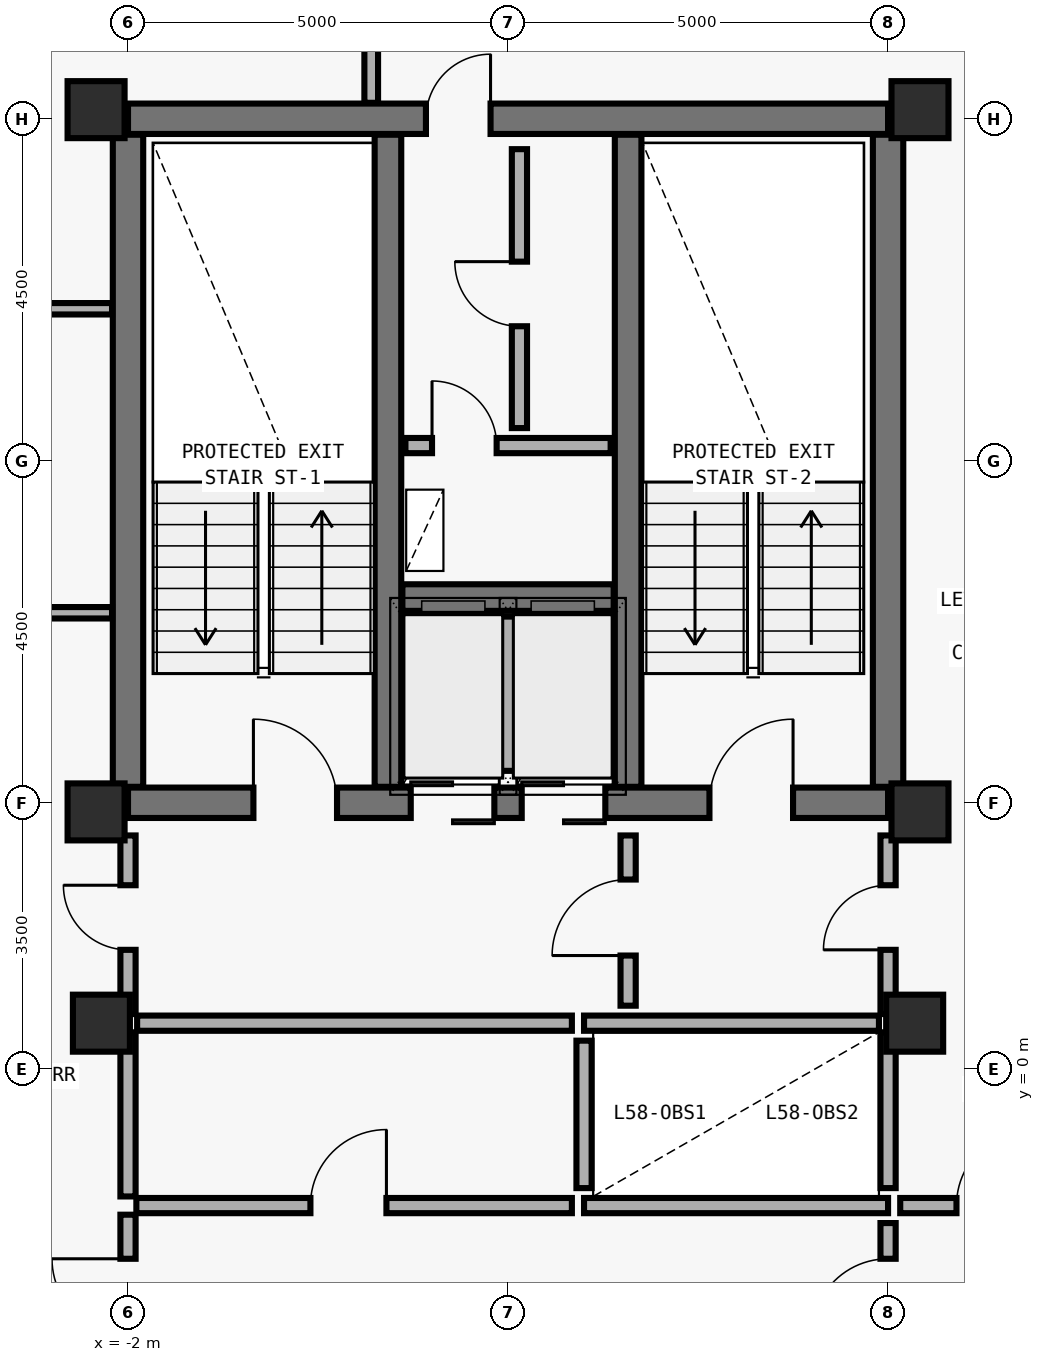
"""IFC4 building model, lengths in metres.
Left out: names, types, materials, properties, quantities, classifications, styles, units other than length and angle.
Written with IfcOpenShell. Run it as: python <this file> out.ifc"""

import sys

from ifc_helpers import new_model, si_unit, direction, frame, frame_2d, origin, origin_2d, place, context, subcontext, project, spatial, rectangle, extrude, element, fill, save


model = new_model("IFC4")
c1 = context("Model", 3, precision=1e-05, world=origin(), true_north=direction((0.0, 1.0)))
c2 = subcontext(c1, "Body", "Model", "MODEL_VIEW")
j1 = project(units=[si_unit("LENGTHUNIT", "METRE"), si_unit("PLANEANGLEUNIT", "RADIAN")], contexts=[c1])
p1 = place(None, origin())
s1 = spatial("IfcSite", under=j1, at=p1, CompositionType="ELEMENT")
p2 = place(p1, origin())
s2 = spatial("IfcBuilding", under=s1, at=p2, CompositionType="ELEMENT")
p3 = place(p2, frame((0.0, 0.0, 229.2)))
s3 = spatial("IfcBuildingStorey", under=s2, at=p3, CompositionType="ELEMENT", Elevation=229.2)
p4 = place(p3, frame((-2.0, 3.5, 0.0), z_axis=(0.0, 0.0, 1.0), x_axis=(1.0, 0.0, 0.0)))
e1 = element("IfcWall", 1, at=p4, inside=s3, PredefinedType="SHEAR", context=c2, shape_type="SweptSolid", body=[
    extrude(rectangle(XDim=10.0, YDim=0.4, at=frame_2d((5.0, 0.0))), origin(), (0.0, 0.0, 1.0), 3.592),
])
p5 = place(p4, frame((1.65, 0.0, 0.0)))
e2 = element("IfcOpeningElement", 2, at=p5, cuts=e1, PredefinedType="OPENING", context=c2, shape_type="SweptSolid", body=[
    extrude(rectangle(XDim=1.1, YDim=2.15, at=frame_2d((0.55, 1.075))), frame((0.0, 0.21, 0.0), z_axis=(0.0, -1.0, 0.0), x_axis=(1.0, 0.0, 0.0)), (0.0, 0.0, 1.0), 0.42),
])
p6 = place(p4, frame((7.65, 0.0, 0.0)))
e3 = element("IfcOpeningElement", 3, at=p6, cuts=e1, PredefinedType="OPENING", context=c2, shape_type="SweptSolid", body=[
    extrude(rectangle(XDim=1.1, YDim=2.15, at=frame_2d((0.55, 1.075))), frame((0.0, 0.21, 0.0), z_axis=(0.0, -1.0, 0.0), x_axis=(1.0, 0.0, 0.0)), (0.0, 0.0, 1.0), 0.42),
])
p7 = place(p4, frame((3.72, 0.0, 0.0)))
e4 = element("IfcOpeningElement", 4, at=p7, cuts=e1, PredefinedType="OPENING", context=c2, shape_type="SweptSolid", body=[
    extrude(rectangle(XDim=1.1, YDim=2.2, at=frame_2d((0.55, 1.1))), frame((0.0, 0.21, 0.0), z_axis=(0.0, -1.0, 0.0), x_axis=(1.0, 0.0, 0.0)), (0.0, 0.0, 1.0), 0.42),
])
p8 = place(p4, frame((5.18, 0.0, 0.0)))
e5 = element("IfcOpeningElement", 5, at=p8, cuts=e1, PredefinedType="OPENING", context=c2, shape_type="SweptSolid", body=[
    extrude(rectangle(XDim=1.1, YDim=2.2, at=frame_2d((0.55, 1.1))), frame((0.0, 0.21, 0.0), z_axis=(0.0, -1.0, 0.0), x_axis=(1.0, 0.0, 0.0)), (0.0, 0.0, 1.0), 0.42),
])
p9 = place(p3, frame((-2.0, 12.5, 0.0), z_axis=(0.0, 0.0, 1.0), x_axis=(1.0, 0.0, 0.0)))
e6 = element("IfcWall", 6, at=p9, inside=s3, PredefinedType="SHEAR", context=c2, shape_type="SweptSolid", body=[
    extrude(rectangle(XDim=10.0, YDim=0.4, at=frame_2d((5.0, 0.0))), origin(), (0.0, 0.0, 1.0), 3.592),
])
p10 = place(p9, frame((3.92, 0.0, 0.0)))
e7 = element("IfcOpeningElement", 7, at=p10, cuts=e6, PredefinedType="OPENING", context=c2, shape_type="SweptSolid", body=[
    extrude(rectangle(XDim=0.85, YDim=2.1, at=frame_2d((0.425, 1.05))), frame((0.0, 0.21, 0.0), z_axis=(0.0, -1.0, 0.0), x_axis=(1.0, 0.0, 0.0)), (0.0, 0.0, 1.0), 0.42),
])
for number, where, z_axis, x_axis in (
    (8, (-2.0, 3.71, 0.0), (0.0, 0.0, 1.0), (0.0, 1.0, 0.0)),
    (9, (8.0, 3.71, 0.0), (0.0, 0.0, 1.0), (0.0, 1.0, 0.0)),
):
    element("IfcWall", number, at=place(p3, frame(where, z_axis=z_axis, x_axis=x_axis)), inside=s3, PredefinedType="SHEAR", context=c2, shape_type="SweptSolid", body=[
        extrude(rectangle(XDim=8.58, YDim=0.4, at=frame_2d((4.29, 0.0))), origin(), (0.0, 0.0, 1.0), 3.592),
    ])
for number, where, z_axis, x_axis in (
    (10, (1.42, 3.71, 0.0), (0.0, 0.0, 1.0), (0.0, 1.0, 0.0)),
    (11, (4.58, 3.71, 0.0), (0.0, 0.0, 1.0), (0.0, 1.0, 0.0)),
):
    element("IfcWall", number, at=place(p3, frame(where, z_axis=z_axis, x_axis=x_axis)), inside=s3, PredefinedType="SHEAR", context=c2, shape_type="SweptSolid", body=[
        extrude(rectangle(XDim=8.58, YDim=0.35, at=frame_2d((4.29, 0.0))), origin(), (0.0, 0.0, 1.0), 3.592),
    ])
p11 = place(p3, frame((1.61, 6.2, 0.0), z_axis=(0.0, 0.0, 1.0), x_axis=(1.0, 0.0, 0.0)))
e12 = element("IfcWall", 12, at=p11, inside=s3, PredefinedType="SHEAR", context=c2, shape_type="SweptSolid", body=[
    extrude(rectangle(XDim=2.78, YDim=0.35, at=frame_2d((1.39, 0.0))), origin(), (0.0, 0.0, 1.0), 3.592),
])
for number, where, z_axis, x_axis in (
    (13, (-2.42, 12.62, 0.0), (0.0, 0.0, 1.0), (1.0, 0.0, 0.0)),
    (14, (8.42, 12.62, 0.0), (0.0, 0.0, 1.0), (1.0, 0.0, 0.0)),
    (15, (-2.42, 3.38, 0.0), (0.0, 0.0, 1.0), (1.0, 0.0, 0.0)),
    (16, (8.42, 3.38, 0.0), (0.0, 0.0, 1.0), (1.0, 0.0, 0.0)),
    (17, (-2.35, 0.6, 0.0), (0.0, 0.0, 1.0), (1.0, 0.0, 0.0)),
    (18, (8.35, 0.6, 0.0), (0.0, 0.0, 1.0), (1.0, 0.0, 0.0)),
):
    element("IfcColumn", number, at=place(p3, frame(where, z_axis=z_axis, x_axis=x_axis)), inside=s3, PredefinedType="COLUMN", context=c2, shape_type="SweptSolid", body=[
        extrude(rectangle(XDim=0.75, YDim=0.75, at=origin_2d()), origin(), (0.0, 0.0, 1.0), 3.575),
    ])
p12 = place(p3, frame((3.0, 3.92, 0.0), z_axis=(0.0, 0.0, 1.0), x_axis=(0.0, 1.0, 0.0)))
e19 = element("IfcWall", 19, at=p12, inside=s3, PredefinedType="SOLIDWALL", context=c2, shape_type="SweptSolid", body=[
    extrude(rectangle(XDim=2.03, YDim=0.2, at=frame_2d((1.015, 0.0))), origin(), (0.0, 0.0, 1.0), 3.36),
])
p13 = place(p3, frame((4.0, 0.6, 0.0), z_axis=(0.0, 0.0, 1.0), x_axis=(1.0, 0.0, 0.0)))
e20 = element("IfcWall", 20, at=p13, inside=s3, PredefinedType="SOLIDWALL", context=c2, shape_type="SweptSolid", body=[
    extrude(rectangle(XDim=3.88, YDim=0.2, at=frame_2d((1.94, 0.0))), origin(), (0.0, 0.0, 1.0), 3.072),
])
p14 = place(p3, frame((4.0, -1.8, 0.0), z_axis=(0.0, 0.0, 1.0), x_axis=(1.0, 0.0, 0.0)))
e21 = element("IfcWall", 21, at=p14, inside=s3, PredefinedType="SOLIDWALL", context=c2, shape_type="SweptSolid", body=[
    extrude(rectangle(XDim=4.0, YDim=0.2, at=frame_2d((2.0, 0.0))), origin(), (0.0, 0.0, 1.0), 3.36),
])
p15 = place(p3, frame((4.0, -1.57, 0.0), z_axis=(0.0, 0.0, 1.0), x_axis=(0.0, 1.0, 0.0)))
e22 = element("IfcWall", 22, at=p15, inside=s3, PredefinedType="SOLIDWALL", context=c2, shape_type="SweptSolid", body=[
    extrude(rectangle(XDim=1.94, YDim=0.2, at=frame_2d((0.97, 0.0))), origin(), (0.0, 0.0, 1.0), 3.36),
])
p16 = place(p3, frame((8.0, -1.57, 0.0), z_axis=(0.0, 0.0, 1.0), x_axis=(0.0, 1.0, 0.0)))
e23 = element("IfcWall", 23, at=p16, inside=s3, PredefinedType="SOLIDWALL", context=c2, shape_type="SweptSolid", body=[
    extrude(rectangle(XDim=2.05, YDim=0.2, at=frame_2d((1.025, 0.0))), origin(), (0.0, 0.0, 1.0), 3.072),
])
p17 = place(p3, frame((1.65, 8.2, 0.0), z_axis=(0.0, 0.0, 1.0), x_axis=(1.0, 0.0, 0.0)))
e24 = element("IfcWall", 24, at=p17, inside=s3, PredefinedType="MOVABLE", context=c2, shape_type="SweptSolid", body=[
    extrude(rectangle(XDim=2.7, YDim=0.2, at=frame_2d((1.35, 0.0))), origin(), (0.0, 0.0, 1.0), 3.36),
])
p18 = place(p17, frame((0.35, 0.0, 0.0)))
e25 = element("IfcOpeningElement", 25, at=p18, cuts=e24, PredefinedType="OPENING", context=c2, shape_type="SweptSolid", body=[
    extrude(rectangle(XDim=0.85, YDim=2.1, at=frame_2d((0.425, 1.05))), frame((0.0, 0.11, 0.0), z_axis=(0.0, -1.0, 0.0), x_axis=(1.0, 0.0, 0.0)), (0.0, 0.0, 1.0), 0.22),
])
p19 = place(p3, frame((3.15, 8.43, 0.0), z_axis=(0.0, 0.0, 1.0), x_axis=(0.0, 1.0, 0.0)))
e26 = element("IfcWall", 26, at=p19, inside=s3, PredefinedType="MOVABLE", context=c2, shape_type="SweptSolid", body=[
    extrude(rectangle(XDim=3.67, YDim=0.2, at=frame_2d((1.835, 0.0))), origin(), (0.0, 0.0, 1.0), 3.36),
])
p20 = place(p19, frame((1.34, 0.0, 0.0)))
e27 = element("IfcOpeningElement", 27, at=p20, cuts=e26, PredefinedType="OPENING", context=c2, shape_type="SweptSolid", body=[
    extrude(rectangle(XDim=0.85, YDim=2.1, at=frame_2d((0.425, 1.05))), frame((0.0, 0.11, 0.0), z_axis=(0.0, -1.0, 0.0), x_axis=(1.0, 0.0, 0.0)), (0.0, 0.0, 1.0), 0.22),
])
p21 = place(p3, frame((4.58, 0.83, 0.0), z_axis=(0.0, 0.0, 1.0), x_axis=(0.0, 1.0, 0.0)))
e28 = element("IfcWall", 28, at=p21, inside=s3, PredefinedType="MOVABLE", context=c2, shape_type="SweptSolid", body=[
    extrude(rectangle(XDim=2.24, YDim=0.2, at=frame_2d((1.12, 0.0))), origin(), (0.0, 0.0, 1.0), 3.36),
])
p22 = place(p21, frame((0.66, 0.0, 0.0)))
e29 = element("IfcOpeningElement", 29, at=p22, cuts=e28, PredefinedType="OPENING", context=c2, shape_type="SweptSolid", body=[
    extrude(rectangle(XDim=1.0, YDim=2.1, at=frame_2d((0.5, 1.05))), frame((0.0, 0.11, 0.0), z_axis=(0.0, -1.0, 0.0), x_axis=(1.0, 0.0, 0.0)), (0.0, 0.0, 1.0), 0.22),
])
p23 = place(p3, frame((-2.0, 0.72, 0.0), z_axis=(0.0, 0.0, 1.0), x_axis=(0.0, 1.0, 0.0)))
e30 = element("IfcWall", 30, at=p23, inside=s3, PredefinedType="MOVABLE", context=c2, shape_type="SweptSolid", body=[
    extrude(rectangle(XDim=2.35, YDim=0.2, at=frame_2d((1.175, 0.0))), origin(), (0.0, 0.0, 1.0), 2.692),
])
p24 = place(p23, frame((0.845, 0.0, 0.0)))
e31 = element("IfcOpeningElement", 31, at=p24, cuts=e30, PredefinedType="OPENING", context=c2, shape_type="SweptSolid", body=[
    extrude(rectangle(XDim=0.85, YDim=2.1, at=frame_2d((0.425, 1.05))), frame((0.0, 0.11, 0.0), z_axis=(0.0, -1.0, 0.0), x_axis=(1.0, 0.0, 0.0)), (0.0, 0.0, 1.0), 0.22),
])
p25 = place(p3, frame((8.0, 0.72, 0.0), z_axis=(0.0, 0.0, 1.0), x_axis=(0.0, 1.0, 0.0)))
e32 = element("IfcWall", 32, at=p25, inside=s3, PredefinedType="MOVABLE", context=c2, shape_type="SweptSolid", body=[
    extrude(rectangle(XDim=2.35, YDim=0.2, at=frame_2d((1.175, 0.0))), origin(), (0.0, 0.0, 1.0), 2.692),
])
p26 = place(p25, frame((0.845, 0.0, 0.0)))
e33 = element("IfcOpeningElement", 33, at=p26, cuts=e32, PredefinedType="OPENING", context=c2, shape_type="SweptSolid", body=[
    extrude(rectangle(XDim=0.85, YDim=2.1, at=frame_2d((0.425, 1.05))), frame((0.0, 0.11, 0.0), z_axis=(0.0, -1.0, 0.0), x_axis=(1.0, 0.0, 0.0)), (0.0, 0.0, 1.0), 0.22),
])
p27 = place(p3, frame((-2.0, -4.08, 0.0), z_axis=(0.0, 0.0, 1.0), x_axis=(0.0, 1.0, 0.0)))
e34 = element("IfcWall", 34, at=p27, inside=s3, PredefinedType="MOVABLE", context=c2, shape_type="SweptSolid", body=[
    extrude(rectangle(XDim=2.16, YDim=0.2, at=frame_2d((1.08, 0.0))), origin(), (0.0, 0.0, 1.0), 3.072),
])
p28 = place(p27, frame((0.58, 0.0, 0.0)))
e35 = element("IfcOpeningElement", 35, at=p28, cuts=e34, PredefinedType="OPENING", context=c2, shape_type="SweptSolid", body=[
    extrude(rectangle(XDim=1.0, YDim=2.1, at=frame_2d((0.5, 1.05))), frame((0.0, 0.11, 0.0), z_axis=(0.0, -1.0, 0.0), x_axis=(1.0, 0.0, 0.0)), (0.0, 0.0, 1.0), 0.22),
])
p29 = place(p3, frame((8.0, -3.97, 0.0), z_axis=(0.0, 0.0, 1.0), x_axis=(0.0, 1.0, 0.0)))
e36 = element("IfcWall", 36, at=p29, inside=s3, PredefinedType="MOVABLE", context=c2, shape_type="SweptSolid", body=[
    extrude(rectangle(XDim=1.94, YDim=0.2, at=frame_2d((0.97, 0.0))), origin(), (0.0, 0.0, 1.0), 3.072),
])
p30 = place(p29, frame((0.47, 0.0, 0.0)))
e37 = element("IfcOpeningElement", 37, at=p30, cuts=e36, PredefinedType="OPENING", context=c2, shape_type="SweptSolid", body=[
    extrude(rectangle(XDim=1.0, YDim=2.1, at=frame_2d((0.5, 1.05))), frame((0.0, 0.11, 0.0), z_axis=(0.0, -1.0, 0.0), x_axis=(1.0, 0.0, 0.0)), (0.0, 0.0, 1.0), 0.22),
])
p31 = place(p3, frame((-1.89, -1.8, 0.0), z_axis=(0.0, 0.0, 1.0), x_axis=(1.0, 0.0, 0.0)))
e38 = element("IfcWall", 38, at=p31, inside=s3, PredefinedType="MOVABLE", context=c2, shape_type="SweptSolid", body=[
    extrude(rectangle(XDim=5.73, YDim=0.2, at=frame_2d((2.865, 0.0))), origin(), (0.0, 0.0, 1.0), 3.36),
])
p32 = place(p31, frame((2.29, 0.0, 0.0)))
e39 = element("IfcOpeningElement", 39, at=p32, cuts=e38, PredefinedType="OPENING", context=c2, shape_type="SweptSolid", body=[
    extrude(rectangle(XDim=1.0, YDim=2.1, at=frame_2d((0.5, 1.05))), frame((0.0, 0.11, 0.0), z_axis=(0.0, -1.0, 0.0), x_axis=(1.0, 0.0, 0.0)), (0.0, 0.0, 1.0), 0.22),
])
p33 = place(p3, frame((8.16, -1.8, 0.0), z_axis=(0.0, 0.0, 1.0), x_axis=(1.0, 0.0, 0.0)))
e40 = element("IfcWall", 40, at=p33, inside=s3, PredefinedType="MOVABLE", context=c2, shape_type="SweptSolid", body=[
    extrude(rectangle(XDim=2.64, YDim=0.2, at=frame_2d((1.32, 0.0))), origin(), (0.0, 0.0, 1.0), 3.36),
])
p34 = place(p33, frame((0.74, 0.0, 0.0)))
e41 = element("IfcOpeningElement", 41, at=p34, cuts=e40, PredefinedType="OPENING", context=c2, shape_type="SweptSolid", body=[
    extrude(rectangle(XDim=1.0, YDim=2.1, at=frame_2d((0.5, 1.05))), frame((0.0, 0.11, 0.0), z_axis=(0.0, -1.0, 0.0), x_axis=(1.0, 0.0, 0.0)), (0.0, 0.0, 1.0), 0.22),
])
p35 = place(p3, frame((-1.88, 0.6, 0.0), z_axis=(0.0, 0.0, 1.0), x_axis=(1.0, 0.0, 0.0)))
e42 = element("IfcWall", 42, at=p35, inside=s3, PredefinedType="MOVABLE", context=c2, shape_type="SweptSolid", body=[
    extrude(rectangle(XDim=5.72, YDim=0.2, at=frame_2d((2.86, 0.0))), origin(), (0.0, 0.0, 1.0), 3.072),
])
p36 = place(p3, frame((-2.0, -1.68, 0.0), z_axis=(0.0, 0.0, 1.0), x_axis=(0.0, 1.0, 0.0)))
e43 = element("IfcWall", 43, at=p36, inside=s3, PredefinedType="MOVABLE", context=c2, shape_type="SweptSolid", body=[
    extrude(rectangle(XDim=2.16, YDim=0.2, at=frame_2d((1.08, 0.0))), origin(), (0.0, 0.0, 1.0), 3.072),
])
p37 = place(p3, frame((-2.21, 6.0, 0.0), z_axis=(0.0, 0.0, 1.0), x_axis=(-1.0, 0.0, 0.0)))
e44 = element("IfcWall", 44, at=p37, inside=s3, PredefinedType="PARTITIONING", context=c2, shape_type="SweptSolid", body=[
    extrude(rectangle(XDim=2.305, YDim=0.15, at=frame_2d((1.152, 0.0))), origin(), (0.0, 0.0, 1.0), 3.36),
])
p38 = place(p3, frame((-4.465, 10.0, 0.0), z_axis=(0.0, 0.0, 1.0), x_axis=(1.0, 0.0, 0.0)))
e45 = element("IfcWall", 45, at=p38, inside=s3, PredefinedType="PARTITIONING", context=c2, shape_type="SweptSolid", body=[
    extrude(rectangle(XDim=2.255, YDim=0.15, at=frame_2d((1.127, 0.0))), origin(), (0.0, 0.0, 1.0), 3.36),
])
p39 = place(p3, frame((1.2, 14.6, 0.0), z_axis=(0.0, 0.0, 1.0), x_axis=(0.0, -1.0, 0.0)))
e46 = element("IfcWall", 46, at=p39, inside=s3, PredefinedType="PLUMBINGWALL", context=c2, shape_type="SweptSolid", body=[
    extrude(rectangle(XDim=1.89, YDim=0.18, at=frame_2d((0.945, 0.0))), origin(), (0.0, 0.0, 1.0), 3.36),
])
p40 = place(p5, origin())
e47 = element("IfcDoor", 47, at=p40, inside=s3, OperationType="SINGLE_SWING_LEFT", PredefinedType="DOOR", context=c2, shape_type="SweptSolid", body=[
    extrude(rectangle(XDim=1.1, YDim=2.15, at=frame_2d((0.55, 1.075))), frame((0.0, 0.025, 0.0), z_axis=(0.0, -1.0, 0.0), x_axis=(1.0, 0.0, 0.0)), (0.0, 0.0, 1.0), 0.05),
])
fill(e2, e47)
p41 = place(p6, origin())
e48 = element("IfcDoor", 48, at=p41, inside=s3, OperationType="SINGLE_SWING_RIGHT", PredefinedType="DOOR", context=c2, shape_type="SweptSolid", body=[
    extrude(rectangle(XDim=1.1, YDim=2.15, at=frame_2d((0.55, 1.075))), frame((0.0, 0.025, 0.0), z_axis=(0.0, -1.0, 0.0), x_axis=(1.0, 0.0, 0.0)), (0.0, 0.0, 1.0), 0.05),
])
fill(e3, e48)
p42 = place(p7, origin())
e49 = element("IfcDoor", 49, at=p42, inside=s3, OperationType="DOUBLE_DOOR_SLIDING", PredefinedType="DOOR", context=c2, shape_type="SweptSolid", body=[
    extrude(rectangle(XDim=1.1, YDim=2.2, at=frame_2d((0.55, 1.1))), frame((0.0, 0.025, 0.0), z_axis=(0.0, -1.0, 0.0), x_axis=(1.0, 0.0, 0.0)), (0.0, 0.0, 1.0), 0.05),
])
fill(e4, e49)
p43 = place(p8, origin())
e50 = element("IfcDoor", 50, at=p43, inside=s3, OperationType="DOUBLE_DOOR_SLIDING", PredefinedType="DOOR", context=c2, shape_type="SweptSolid", body=[
    extrude(rectangle(XDim=1.1, YDim=2.2, at=frame_2d((0.55, 1.1))), frame((0.0, 0.025, 0.0), z_axis=(0.0, -1.0, 0.0), x_axis=(1.0, 0.0, 0.0)), (0.0, 0.0, 1.0), 0.05),
])
fill(e5, e50)
p44 = place(p10, origin())
e51 = element("IfcDoor", 51, at=p44, inside=s3, OperationType="SINGLE_SWING_RIGHT", PredefinedType="DOOR", context=c2, shape_type="SweptSolid", body=[
    extrude(rectangle(XDim=0.85, YDim=2.1, at=frame_2d((0.425, 1.05))), frame((0.0, 0.025, 0.0), z_axis=(0.0, -1.0, 0.0), x_axis=(1.0, 0.0, 0.0)), (0.0, 0.0, 1.0), 0.05),
])
fill(e7, e51)
p45 = place(p18, origin())
e52 = element("IfcDoor", 52, at=p45, inside=s3, OperationType="SINGLE_SWING_LEFT", PredefinedType="DOOR", context=c2, shape_type="SweptSolid", body=[
    extrude(rectangle(XDim=0.85, YDim=2.1, at=frame_2d((0.425, 1.05))), frame((0.0, 0.025, 0.0), z_axis=(0.0, -1.0, 0.0), x_axis=(1.0, 0.0, 0.0)), (0.0, 0.0, 1.0), 0.05),
])
fill(e25, e52)
p46 = place(p20, origin())
e53 = element("IfcDoor", 53, at=p46, inside=s3, OperationType="SINGLE_SWING_RIGHT", PredefinedType="DOOR", context=c2, shape_type="SweptSolid", body=[
    extrude(rectangle(XDim=0.85, YDim=2.1, at=frame_2d((0.425, 1.05))), frame((0.0, 0.025, 0.0), z_axis=(0.0, -1.0, 0.0), x_axis=(1.0, 0.0, 0.0)), (0.0, 0.0, 1.0), 0.05),
])
fill(e27, e53)
p47 = place(p22, origin())
e54 = element("IfcDoor", 54, at=p47, inside=s3, OperationType="SINGLE_SWING_LEFT", PredefinedType="DOOR", context=c2, shape_type="SweptSolid", body=[
    extrude(rectangle(XDim=1.0, YDim=2.1, at=frame_2d((0.5, 1.05))), frame((0.0, 0.025, 0.0), z_axis=(0.0, -1.0, 0.0), x_axis=(1.0, 0.0, 0.0)), (0.0, 0.0, 1.0), 0.05),
])
fill(e29, e54)
p48 = place(p24, origin())
e55 = element("IfcDoor", 55, at=p48, inside=s3, OperationType="SINGLE_SWING_RIGHT", PredefinedType="DOOR", context=c2, shape_type="SweptSolid", body=[
    extrude(rectangle(XDim=0.85, YDim=2.1, at=frame_2d((0.425, 1.05))), frame((0.0, 0.025, 0.0), z_axis=(0.0, -1.0, 0.0), x_axis=(1.0, 0.0, 0.0)), (0.0, 0.0, 1.0), 0.05),
])
fill(e31, e55)
p49 = place(p26, origin())
e56 = element("IfcDoor", 56, at=p49, inside=s3, OperationType="SINGLE_SWING_LEFT", PredefinedType="DOOR", context=c2, shape_type="SweptSolid", body=[
    extrude(rectangle(XDim=0.85, YDim=2.1, at=frame_2d((0.425, 1.05))), frame((0.0, 0.025, 0.0), z_axis=(0.0, -1.0, 0.0), x_axis=(1.0, 0.0, 0.0)), (0.0, 0.0, 1.0), 0.05),
])
fill(e33, e56)
p50 = place(p28, origin())
e57 = element("IfcDoor", 57, at=p50, inside=s3, OperationType="SINGLE_SWING_RIGHT", PredefinedType="DOOR", context=c2, shape_type="SweptSolid", body=[
    extrude(rectangle(XDim=1.0, YDim=2.1, at=frame_2d((0.5, 1.05))), frame((0.0, 0.025, 0.0), z_axis=(0.0, -1.0, 0.0), x_axis=(1.0, 0.0, 0.0)), (0.0, 0.0, 1.0), 0.05),
])
fill(e35, e57)
p51 = place(p30, origin())
e58 = element("IfcDoor", 58, at=p51, inside=s3, OperationType="SINGLE_SWING_LEFT", PredefinedType="DOOR", context=c2, shape_type="SweptSolid", body=[
    extrude(rectangle(XDim=1.0, YDim=2.1, at=frame_2d((0.5, 1.05))), frame((0.0, 0.025, 0.0), z_axis=(0.0, -1.0, 0.0), x_axis=(1.0, 0.0, 0.0)), (0.0, 0.0, 1.0), 0.05),
])
fill(e37, e58)
p52 = place(p32, origin())
e59 = element("IfcDoor", 59, at=p52, inside=s3, OperationType="SINGLE_SWING_RIGHT", PredefinedType="DOOR", context=c2, shape_type="SweptSolid", body=[
    extrude(rectangle(XDim=1.0, YDim=2.1, at=frame_2d((0.5, 1.05))), frame((0.0, 0.025, 0.0), z_axis=(0.0, -1.0, 0.0), x_axis=(1.0, 0.0, 0.0)), (0.0, 0.0, 1.0), 0.05),
])
fill(e39, e59)
p53 = place(p34, origin())
e60 = element("IfcDoor", 60, at=p53, inside=s3, OperationType="SINGLE_SWING_RIGHT", PredefinedType="DOOR", context=c2, shape_type="SweptSolid", body=[
    extrude(rectangle(XDim=1.0, YDim=2.1, at=frame_2d((0.5, 1.05))), frame((0.0, 0.025, 0.0), z_axis=(0.0, -1.0, 0.0), x_axis=(1.0, 0.0, 0.0)), (0.0, 0.0, 1.0), 0.05),
])
fill(e41, e60)
save(model, sys.argv[1])
